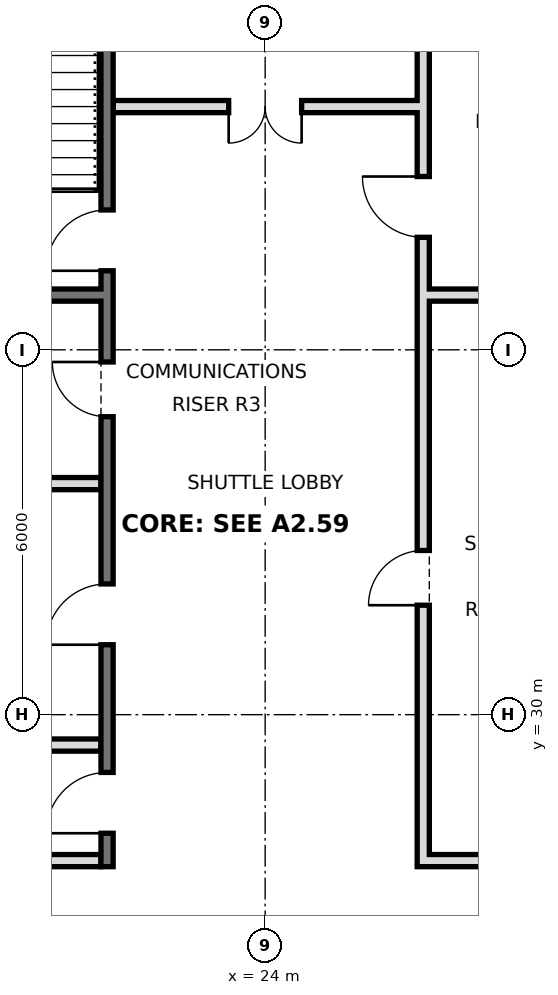
"""IFC4 building model, lengths in metres.
Left out: names, types, materials, properties, quantities, classifications, styles, units other than length and angle.
Written with IfcOpenShell. Run it as: python <this file> out.ifc"""

import sys

from ifc_helpers import new_model, si_unit, direction, frame, frame_2d, origin, place, context, subcontext, project, spatial, rectangle, extrude, element, fill, save


model = new_model("IFC4")
c1 = context("Model", 3, precision=1e-05, world=origin(), true_north=direction((0.0, 1.0)))
c2 = subcontext(c1, "Body", "Model", "MODEL_VIEW")
j1 = project(units=[si_unit("LENGTHUNIT", "METRE"), si_unit("PLANEANGLEUNIT", "RADIAN")], contexts=[c1])
p1 = place(None, origin())
s1 = spatial("IfcSite", under=j1, at=p1, CompositionType="ELEMENT")
p2 = place(p1, origin())
s2 = spatial("IfcBuilding", under=s1, at=p2, CompositionType="ELEMENT")
p3 = place(p2, frame((0.0, 0.0, 234.2)))
s3 = spatial("IfcBuildingStorey", under=s2, at=p3, CompositionType="ELEMENT", Elevation=234.2)
p4 = place(p3, frame((21.4, 27.5, 0.0), z_axis=(0.0, 0.0, 1.0), x_axis=(0.0, 1.0, 0.0)))
e1 = element("IfcWall", 1, at=p4, inside=s3, PredefinedType="SOLIDWALL", context=c2, shape_type="SweptSolid", body=[
    extrude(rectangle(XDim=17.5, YDim=0.2, at=frame_2d((8.75, 0.0))), origin(), (0.0, 0.0, 1.0), 5.22),
])
p5 = place(p4, frame((0.55, 0.0, 0.0)))
e2 = element("IfcOpeningElement", 2, at=p5, cuts=e1, PredefinedType="OPENING", context=c2, shape_type="SweptSolid", body=[
    extrude(rectangle(XDim=1.0, YDim=2.1, at=frame_2d((0.5, 1.05))), frame((0.0, 0.11, 0.0), z_axis=(0.0, -1.0, 0.0), x_axis=(1.0, 0.0, 0.0)), (0.0, 0.0, 1.0), 0.22),
])
p6 = place(p4, frame((3.65, 0.0, 0.0)))
e3 = element("IfcOpeningElement", 3, at=p6, cuts=e1, PredefinedType="OPENING", context=c2, shape_type="SweptSolid", body=[
    extrude(rectangle(XDim=1.0, YDim=2.1, at=frame_2d((0.5, 1.05))), frame((0.0, 0.11, 0.0), z_axis=(0.0, -1.0, 0.0), x_axis=(1.0, 0.0, 0.0)), (0.0, 0.0, 1.0), 0.22),
])
p7 = place(p4, frame((16.2, 0.0, 0.0)))
e4 = element("IfcOpeningElement", 4, at=p7, cuts=e1, PredefinedType="OPENING", context=c2, shape_type="SweptSolid", body=[
    extrude(rectangle(XDim=1.0, YDim=2.1, at=frame_2d((0.5, 1.05))), frame((0.0, 0.11, 0.0), z_axis=(0.0, -1.0, 0.0), x_axis=(1.0, 0.0, 0.0)), (0.0, 0.0, 1.0), 0.22),
])
p8 = place(p4, frame((9.8, 0.0, 0.0)))
e5 = element("IfcOpeningElement", 5, at=p8, cuts=e1, PredefinedType="OPENING", context=c2, shape_type="SweptSolid", body=[
    extrude(rectangle(XDim=1.0, YDim=2.1, at=frame_2d((0.5, 1.05))), frame((0.0, 0.11, 0.0), z_axis=(0.0, -1.0, 0.0), x_axis=(1.0, 0.0, 0.0)), (0.0, 0.0, 1.0), 0.22),
])
p9 = place(p4, frame((7.4, 0.0, 0.0)))
e6 = element("IfcOpeningElement", 6, at=p9, cuts=e1, PredefinedType="OPENING", context=c2, shape_type="SweptSolid", body=[
    extrude(rectangle(XDim=0.9, YDim=2.1, at=frame_2d((0.45, 1.05))), frame((0.0, 0.11, 0.0), z_axis=(0.0, -1.0, 0.0), x_axis=(1.0, 0.0, 0.0)), (0.0, 0.0, 1.0), 0.22),
])
p10 = place(p3, frame((26.6, 27.5, 0.0), z_axis=(0.0, 0.0, 1.0), x_axis=(0.0, 1.0, 0.0)))
e7 = element("IfcWall", 7, at=p10, inside=s3, PredefinedType="SOLIDWALL", context=c2, shape_type="SweptSolid", body=[
    extrude(rectangle(XDim=17.5, YDim=0.2, at=frame_2d((8.75, 0.0))), origin(), (0.0, 0.0, 1.0), 5.22),
])
p11 = place(p10, frame((4.3, 0.0, 0.0)))
e8 = element("IfcOpeningElement", 8, at=p11, cuts=e7, PredefinedType="OPENING", context=c2, shape_type="SweptSolid", body=[
    extrude(rectangle(XDim=0.9, YDim=2.1, at=frame_2d((0.45, 1.05))), frame((0.0, 0.11, 0.0), z_axis=(0.0, -1.0, 0.0), x_axis=(1.0, 0.0, 0.0)), (0.0, 0.0, 1.0), 0.22),
])
p12 = place(p10, frame((10.35, 0.0, 0.0)))
e9 = element("IfcOpeningElement", 9, at=p12, cuts=e7, PredefinedType="OPENING", context=c2, shape_type="SweptSolid", body=[
    extrude(rectangle(XDim=1.0, YDim=2.1, at=frame_2d((0.5, 1.05))), frame((0.0, 0.11, 0.0), z_axis=(0.0, -1.0, 0.0), x_axis=(1.0, 0.0, 0.0)), (0.0, 0.0, 1.0), 0.22),
])
p13 = place(p10, frame((15.475, 0.0, 0.0)))
e10 = element("IfcOpeningElement", 10, at=p13, cuts=e7, PredefinedType="OPENING", context=c2, shape_type="SweptSolid", body=[
    extrude(rectangle(XDim=1.0, YDim=2.1, at=frame_2d((0.5, 1.05))), frame((0.0, 0.11, 0.0), z_axis=(0.0, -1.0, 0.0), x_axis=(1.0, 0.0, 0.0)), (0.0, 0.0, 1.0), 0.22),
])
p14 = place(p3, frame((18.6, 27.6, 0.0), z_axis=(0.0, 0.0, 1.0), x_axis=(1.0, 0.0, 0.0)))
e11 = element("IfcWall", 11, at=p14, inside=s3, PredefinedType="PARTITIONING", context=c2, shape_type="SweptSolid", body=[
    extrude(rectangle(XDim=2.7, YDim=0.2, at=frame_2d((1.35, 0.0))), origin(), (0.0, 0.0, 1.0), 5.22),
])
p15 = place(p3, frame((26.7, 27.6, 0.0), z_axis=(0.0, 0.0, 1.0), x_axis=(1.0, 0.0, 0.0)))
e12 = element("IfcWall", 12, at=p15, inside=s3, PredefinedType="SOLIDWALL", context=c2, shape_type="SweptSolid", body=[
    extrude(rectangle(XDim=2.7, YDim=0.2, at=frame_2d((1.35, 0.0))), origin(), (0.0, 0.0, 1.0), 5.22),
])
p16 = place(p3, frame((18.6, 29.5, 0.0), z_axis=(0.0, 0.0, 1.0), x_axis=(1.0, 0.0, 0.0)))
e13 = element("IfcWall", 13, at=p16, inside=s3, PredefinedType="PARTITIONING", context=c2, shape_type="SweptSolid", body=[
    extrude(rectangle(XDim=2.7, YDim=0.2, at=frame_2d((1.35, 0.0))), origin(), (0.0, 0.0, 1.0), 5.22),
])
for number, where, z_axis, x_axis in (
    (14, (18.6, 33.8, 0.0), (0.0, 0.0, 1.0), (1.0, 0.0, 0.0)),
    (15, (18.6, 36.9, 0.0), (0.0, 0.0, 1.0), (1.0, 0.0, 0.0)),
    (16, (26.7, 36.9, 0.0), (0.0, 0.0, 1.0), (1.0, 0.0, 0.0)),
):
    element("IfcWall", number, at=place(p3, frame(where, z_axis=z_axis, x_axis=x_axis)), inside=s3, PredefinedType="SOLIDWALL", context=c2, shape_type="SweptSolid", body=[
        extrude(rectangle(XDim=2.7, YDim=0.2, at=frame_2d((1.35, 0.0))), origin(), (0.0, 0.0, 1.0), 5.22),
    ])
p17 = place(p3, frame((21.5, 40.0, 0.0), z_axis=(0.0, 0.0, 1.0), x_axis=(1.0, 0.0, 0.0)))
e17 = element("IfcWall", 17, at=p17, inside=s3, PredefinedType="PARTITIONING", context=c2, shape_type="SweptSolid", body=[
    extrude(rectangle(XDim=5.0, YDim=0.2, at=frame_2d((2.5, 0.0))), origin(), (0.0, 0.0, 1.0), 5.22),
])
p18 = place(p17, frame((1.9, 0.0, 0.0)))
e18 = element("IfcOpeningElement", 18, at=p18, cuts=e17, PredefinedType="OPENING", context=c2, shape_type="SweptSolid", body=[
    extrude(rectangle(XDim=1.2, YDim=2.1, at=frame_2d((0.6, 1.05))), frame((0.0, 0.11, 0.0), z_axis=(0.0, -1.0, 0.0), x_axis=(1.0, 0.0, 0.0)), (0.0, 0.0, 1.0), 0.22),
])
p19 = place(p18, frame((1.2, 0.0, 0.0), z_axis=(0.0, 0.0, 1.0), x_axis=(-1.0, 0.0, 0.0)))
e19 = element("IfcDoor", 19, at=p19, inside=s3, OperationType="DOUBLE_DOOR_SINGLE_SWING", PredefinedType="DOOR", context=c2, shape_type="SweptSolid", body=[
    extrude(rectangle(XDim=1.2, YDim=2.1, at=frame_2d((0.6, 1.05))), frame((0.0, 0.025, 0.0), z_axis=(0.0, -1.0, 0.0), x_axis=(1.0, 0.0, 0.0)), (0.0, 0.0, 1.0), 0.05),
])
fill(e18, e19)
p20 = place(p5, origin())
e20 = element("IfcDoor", 20, at=p20, inside=s3, OperationType="SINGLE_SWING_LEFT", PredefinedType="DOOR", context=c2, shape_type="SweptSolid", body=[
    extrude(rectangle(XDim=1.0, YDim=2.1, at=frame_2d((0.5, 1.05))), frame((0.0, 0.025, 0.0), z_axis=(0.0, -1.0, 0.0), x_axis=(1.0, 0.0, 0.0)), (0.0, 0.0, 1.0), 0.05),
])
fill(e2, e20)
p21 = place(p6, origin())
e21 = element("IfcDoor", 21, at=p21, inside=s3, OperationType="SINGLE_SWING_LEFT", PredefinedType="DOOR", context=c2, shape_type="SweptSolid", body=[
    extrude(rectangle(XDim=1.0, YDim=2.1, at=frame_2d((0.5, 1.05))), frame((0.0, 0.025, 0.0), z_axis=(0.0, -1.0, 0.0), x_axis=(1.0, 0.0, 0.0)), (0.0, 0.0, 1.0), 0.05),
])
fill(e3, e21)
p22 = place(p8, origin())
e22 = element("IfcDoor", 22, at=p22, inside=s3, OperationType="SINGLE_SWING_LEFT", PredefinedType="DOOR", context=c2, shape_type="SweptSolid", body=[
    extrude(rectangle(XDim=1.0, YDim=2.1, at=frame_2d((0.5, 1.05))), frame((0.0, 0.025, 0.0), z_axis=(0.0, -1.0, 0.0), x_axis=(1.0, 0.0, 0.0)), (0.0, 0.0, 1.0), 0.05),
])
fill(e5, e22)
p23 = place(p9, frame((0.9, 0.0, 0.0), z_axis=(0.0, 0.0, 1.0), x_axis=(-1.0, 0.0, 0.0)))
e23 = element("IfcDoor", 23, at=p23, inside=s3, OperationType="SINGLE_SWING_LEFT", PredefinedType="DOOR", context=c2, shape_type="SweptSolid", body=[
    extrude(rectangle(XDim=0.9, YDim=2.1, at=frame_2d((0.45, 1.05))), frame((0.0, 0.025, 0.0), z_axis=(0.0, -1.0, 0.0), x_axis=(1.0, 0.0, 0.0)), (0.0, 0.0, 1.0), 0.05),
])
fill(e6, e23)
p24 = place(p11, origin())
e24 = element("IfcDoor", 24, at=p24, inside=s3, OperationType="SINGLE_SWING_LEFT", PredefinedType="DOOR", context=c2, shape_type="SweptSolid", body=[
    extrude(rectangle(XDim=0.9, YDim=2.1, at=frame_2d((0.45, 1.05))), frame((0.0, 0.025, 0.0), z_axis=(0.0, -1.0, 0.0), x_axis=(1.0, 0.0, 0.0)), (0.0, 0.0, 1.0), 0.05),
])
fill(e8, e24)
p25 = place(p12, frame((1.0, 0.0, 0.0), z_axis=(0.0, 0.0, 1.0), x_axis=(-1.0, 0.0, 0.0)))
e25 = element("IfcDoor", 25, at=p25, inside=s3, OperationType="SINGLE_SWING_LEFT", PredefinedType="DOOR", context=c2, shape_type="SweptSolid", body=[
    extrude(rectangle(XDim=1.0, YDim=2.1, at=frame_2d((0.5, 1.05))), frame((0.0, 0.025, 0.0), z_axis=(0.0, -1.0, 0.0), x_axis=(1.0, 0.0, 0.0)), (0.0, 0.0, 1.0), 0.05),
])
fill(e9, e25)
save(model, sys.argv[1])
